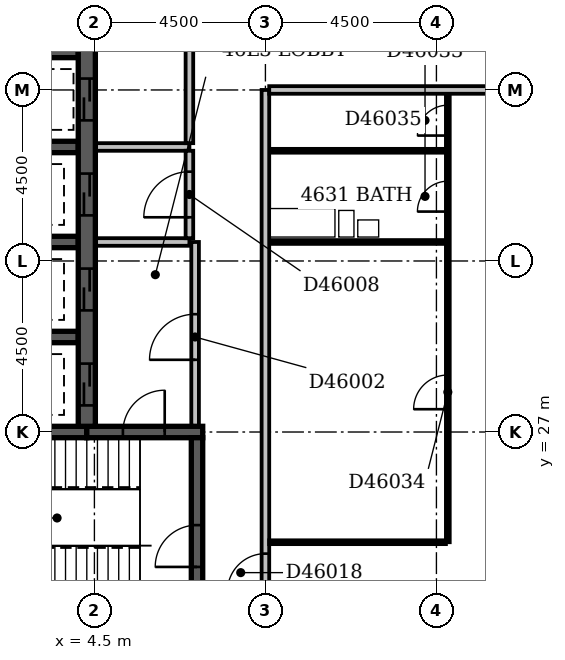
"""IFC4 building model, lengths in metres.
Left out: names, types, materials, properties, quantities, classifications, styles, units other than length and angle.
Written with IfcOpenShell. Run it as: python <this file> out.ifc"""

import sys

from ifc_helpers import new_model, si_unit, direction, frame, frame_2d, origin, place, context, subcontext, project, spatial, rectangle, extrude, element, fill, save


model = new_model("IFC4")
c1 = context("Model", 3, precision=1e-05, world=origin(), true_north=direction((0.0, 1.0)))
c2 = subcontext(c1, "Body", "Model", "MODEL_VIEW")
j1 = project(units=[si_unit("LENGTHUNIT", "METRE"), si_unit("PLANEANGLEUNIT", "RADIAN")], contexts=[c1])
p1 = place(None, origin())
s1 = spatial("IfcSite", under=j1, at=p1, CompositionType="ELEMENT")
p2 = place(p1, origin())
s2 = spatial("IfcBuilding", under=s1, at=p2, CompositionType="ELEMENT")
p3 = place(p2, frame((0.0, 0.0, 182.6)))
s3 = spatial("IfcBuildingStorey", under=s2, at=p3, CompositionType="ELEMENT", Elevation=182.6)
p4 = place(p3, frame((0.35, 27.0, -0.3), z_axis=(0.0, 0.0, 1.0), x_axis=(1.0, 0.0, 0.0)))
e1 = element("IfcWall", 1, at=p4, inside=s3, PredefinedType="SHEAR", context=c2, shape_type="SweptSolid", body=[
    extrude(rectangle(XDim=3.95, YDim=0.3, at=frame_2d((1.975, 0.0))), origin(), (0.0, 0.0, 1.0), 3.55),
])
for number, where, z_axis, x_axis in (
    (2, (0.725, 29.5, -0.3), (0.0, 0.0, 1.0), (1.0, 0.0, 0.0)),
    (3, (0.725, 32.0, -0.3), (0.0, 0.0, 1.0), (1.0, 0.0, 0.0)),
    (4, (0.725, 34.5, -0.3), (0.0, 0.0, 1.0), (1.0, 0.0, 0.0)),
    (5, (0.725, 37.0, -0.3), (0.0, 0.0, 1.0), (1.0, 0.0, 0.0)),
):
    element("IfcWall", number, at=place(p3, frame(where, z_axis=z_axis, x_axis=x_axis)), inside=s3, PredefinedType="SHEAR", context=c2, shape_type="SweptSolid", body=[
        extrude(rectangle(XDim=3.35, YDim=0.3, at=frame_2d((1.675, 0.0))), origin(), (0.0, 0.0, 1.0), 3.55),
    ])
p5 = place(p3, frame((4.3, 27.0, -0.3), z_axis=(0.0, 0.0, 1.0), x_axis=(1.0, 0.0, 0.0)))
e6 = element("IfcWall", 6, at=p5, inside=s3, PredefinedType="SHEAR", context=c2, shape_type="SweptSolid", body=[
    extrude(rectangle(XDim=3.05, YDim=0.3, at=frame_2d((1.525, 0.0))), origin(), (0.0, 0.0, 1.0), 3.55),
])
p6 = place(p5, frame((0.95, 0.0, 0.3)))
e7 = element("IfcOpeningElement", 7, at=p6, cuts=e6, PredefinedType="OPENING", context=c2, shape_type="SweptSolid", body=[
    extrude(rectangle(XDim=1.1, YDim=2.1, at=frame_2d((0.55, 1.05))), frame((0.0, 0.162, 0.0), z_axis=(0.0, -1.0, 0.0), x_axis=(1.0, 0.0, 0.0)), (0.0, 0.0, 1.0), 0.324),
])
p7 = place(p3, frame((4.3, 27.15, -0.3), z_axis=(0.0, 0.0, 1.0), x_axis=(0.0, 1.0, 0.0)))
e8 = element("IfcWall", 8, at=p7, inside=s3, PredefinedType="SHEAR", context=c2, shape_type="SweptSolid", body=[
    extrude(rectangle(XDim=22.125, YDim=0.45, at=frame_2d((11.062, 0.0))), origin(), (0.0, 0.0, 1.0), 3.55),
])
p8 = place(p7, frame((3.05, 0.0, 0.3)))
e9 = element("IfcOpeningElement", 9, at=p8, cuts=e8, PredefinedType="OPENING", context=c2, shape_type="SweptSolid", body=[
    extrude(rectangle(XDim=1.1, YDim=2.1, at=frame_2d((0.55, 1.05))), frame((0.0, 0.237, 0.0), z_axis=(0.0, -1.0, 0.0), x_axis=(1.0, 0.0, 0.0)), (0.0, 0.0, 1.0), 0.474),
])
p9 = place(p7, frame((0.55, 0.0, 0.3)))
e10 = element("IfcOpeningElement", 10, at=p9, cuts=e8, PredefinedType="OPENING", context=c2, shape_type="SweptSolid", body=[
    extrude(rectangle(XDim=1.1, YDim=2.1, at=frame_2d((0.55, 1.05))), frame((0.0, 0.237, 0.0), z_axis=(0.0, -1.0, 0.0), x_axis=(1.0, 0.0, 0.0)), (0.0, 0.0, 1.0), 0.474),
])
p10 = place(p7, frame((20.55, 0.0, 0.3)))
e11 = element("IfcOpeningElement", 11, at=p10, cuts=e8, PredefinedType="OPENING", context=c2, shape_type="SweptSolid", body=[
    extrude(rectangle(XDim=1.1, YDim=2.1, at=frame_2d((0.55, 1.05))), frame((0.0, 0.237, 0.0), z_axis=(0.0, -1.0, 0.0), x_axis=(1.0, 0.0, 0.0)), (0.0, 0.0, 1.0), 0.474),
])
p11 = place(p7, frame((18.05, 0.0, 0.3)))
e12 = element("IfcOpeningElement", 12, at=p11, cuts=e8, PredefinedType="OPENING", context=c2, shape_type="SweptSolid", body=[
    extrude(rectangle(XDim=1.1, YDim=2.1, at=frame_2d((0.55, 1.05))), frame((0.0, 0.237, 0.0), z_axis=(0.0, -1.0, 0.0), x_axis=(1.0, 0.0, 0.0)), (0.0, 0.0, 1.0), 0.474),
])
p12 = place(p7, frame((15.55, 0.0, 0.3)))
e13 = element("IfcOpeningElement", 13, at=p12, cuts=e8, PredefinedType="OPENING", context=c2, shape_type="SweptSolid", body=[
    extrude(rectangle(XDim=1.1, YDim=2.1, at=frame_2d((0.55, 1.05))), frame((0.0, 0.237, 0.0), z_axis=(0.0, -1.0, 0.0), x_axis=(1.0, 0.0, 0.0)), (0.0, 0.0, 1.0), 0.474),
])
p13 = place(p7, frame((13.05, 0.0, 0.3)))
e14 = element("IfcOpeningElement", 14, at=p13, cuts=e8, PredefinedType="OPENING", context=c2, shape_type="SweptSolid", body=[
    extrude(rectangle(XDim=1.1, YDim=2.1, at=frame_2d((0.55, 1.05))), frame((0.0, 0.237, 0.0), z_axis=(0.0, -1.0, 0.0), x_axis=(1.0, 0.0, 0.0)), (0.0, 0.0, 1.0), 0.474),
])
p14 = place(p7, frame((10.55, 0.0, 0.3)))
e15 = element("IfcOpeningElement", 15, at=p14, cuts=e8, PredefinedType="OPENING", context=c2, shape_type="SweptSolid", body=[
    extrude(rectangle(XDim=1.1, YDim=2.1, at=frame_2d((0.55, 1.05))), frame((0.0, 0.237, 0.0), z_axis=(0.0, -1.0, 0.0), x_axis=(1.0, 0.0, 0.0)), (0.0, 0.0, 1.0), 0.474),
])
p15 = place(p7, frame((8.05, 0.0, 0.3)))
e16 = element("IfcOpeningElement", 16, at=p15, cuts=e8, PredefinedType="OPENING", context=c2, shape_type="SweptSolid", body=[
    extrude(rectangle(XDim=1.1, YDim=2.1, at=frame_2d((0.55, 1.05))), frame((0.0, 0.237, 0.0), z_axis=(0.0, -1.0, 0.0), x_axis=(1.0, 0.0, 0.0)), (0.0, 0.0, 1.0), 0.474),
])
p16 = place(p7, frame((5.55, 0.0, 0.3)))
e17 = element("IfcOpeningElement", 17, at=p16, cuts=e8, PredefinedType="OPENING", context=c2, shape_type="SweptSolid", body=[
    extrude(rectangle(XDim=1.1, YDim=2.1, at=frame_2d((0.55, 1.05))), frame((0.0, 0.237, 0.0), z_axis=(0.0, -1.0, 0.0), x_axis=(1.0, 0.0, 0.0)), (0.0, 0.0, 1.0), 0.474),
])
p17 = place(p3, frame((7.2, 22.65, -0.3), z_axis=(0.0, 0.0, 1.0), x_axis=(0.0, 1.0, 0.0)))
e18 = element("IfcWall", 18, at=p17, inside=s3, PredefinedType="SHEAR", context=c2, shape_type="SweptSolid", body=[
    extrude(rectangle(XDim=4.2, YDim=0.3, at=frame_2d((2.1, 0.0))), origin(), (0.0, 0.0, 1.0), 3.55),
])
p18 = place(p17, frame((0.8, 0.0, 0.3)))
e19 = element("IfcOpeningElement", 19, at=p18, cuts=e18, PredefinedType="OPENING", context=c2, shape_type="SweptSolid", body=[
    extrude(rectangle(XDim=1.1, YDim=2.1, at=frame_2d((0.55, 1.05))), frame((0.0, 0.162, 0.0), z_axis=(0.0, -1.0, 0.0), x_axis=(1.0, 0.0, 0.0)), (0.0, 0.0, 1.0), 0.324),
])
p19 = place(p3, frame((4.545, 34.5, 0.0), z_axis=(0.0, 0.0, 1.0), x_axis=(1.0, 0.0, 0.0)))
e20 = element("IfcWall", 20, at=p19, inside=s3, PredefinedType="PARTITIONING", context=c2, shape_type="SweptSolid", body=[
    extrude(rectangle(XDim=2.455, YDim=0.2, at=frame_2d((1.228, 0.0))), origin(), (0.0, 0.0, 1.0), 3.25),
])
p20 = place(p3, frame((7.0, 34.6, 0.0), z_axis=(0.0, 0.0, 1.0), x_axis=(0.0, 1.0, 0.0)))
e21 = element("IfcWall", 21, at=p20, inside=s3, PredefinedType="PARTITIONING", context=c2, shape_type="SweptSolid", body=[
    extrude(rectangle(XDim=14.9, YDim=0.2, at=frame_2d((7.45, 0.0))), origin(), (0.0, 0.0, 1.0), 3.25),
])
p21 = place(p20, frame((2.8, 0.0, 0.0)))
e22 = element("IfcOpeningElement", 22, at=p21, cuts=e21, PredefinedType="OPENING", context=c2, shape_type="SweptSolid", body=[
    extrude(rectangle(XDim=1.2, YDim=2.1, at=frame_2d((0.6, 1.05))), frame((0.0, 0.112, 0.0), z_axis=(0.0, -1.0, 0.0), x_axis=(1.0, 0.0, 0.0)), (0.0, 0.0, 1.0), 0.224),
])
p22 = place(p20, frame((9.8, 0.0, 0.0)))
e23 = element("IfcOpeningElement", 23, at=p22, cuts=e21, PredefinedType="OPENING", context=c2, shape_type="SweptSolid", body=[
    extrude(rectangle(XDim=1.2, YDim=2.1, at=frame_2d((0.6, 1.05))), frame((0.0, 0.112, 0.0), z_axis=(0.0, -1.0, 0.0), x_axis=(1.0, 0.0, 0.0)), (0.0, 0.0, 1.0), 0.224),
])
p23 = place(p3, frame((4.545, 32.0, 0.0), z_axis=(0.0, 0.0, 1.0), x_axis=(1.0, 0.0, 0.0)))
e24 = element("IfcWall", 24, at=p23, inside=s3, PredefinedType="PARTITIONING", context=c2, shape_type="SweptSolid", body=[
    extrude(rectangle(XDim=2.455, YDim=0.2, at=frame_2d((1.228, 0.0))), origin(), (0.0, 0.0, 1.0), 3.25),
])
p24 = place(p3, frame((7.0, 32.1, 0.0), z_axis=(0.0, 0.0, 1.0), x_axis=(0.0, 1.0, 0.0)))
e25 = element("IfcWall", 25, at=p24, inside=s3, PredefinedType="PARTITIONING", context=c2, shape_type="SweptSolid", body=[
    extrude(rectangle(XDim=2.3, YDim=0.2, at=frame_2d((1.15, 0.0))), origin(), (0.0, 0.0, 1.0), 3.25),
])
p25 = place(p24, frame((0.55, 0.0, 0.0)))
e26 = element("IfcOpeningElement", 26, at=p25, cuts=e25, PredefinedType="OPENING", context=c2, shape_type="SweptSolid", body=[
    extrude(rectangle(XDim=1.2, YDim=2.1, at=frame_2d((0.6, 1.05))), frame((0.0, 0.112, 0.0), z_axis=(0.0, -1.0, 0.0), x_axis=(1.0, 0.0, 0.0)), (0.0, 0.0, 1.0), 0.224),
])
p26 = place(p3, frame((7.15, 27.17, 0.0), z_axis=(0.0, 0.0, 1.0), x_axis=(0.0, 1.0, 0.0)))
e27 = element("IfcWall", 27, at=p26, inside=s3, PredefinedType="PARTITIONING", context=c2, shape_type="SweptSolid", body=[
    extrude(rectangle(XDim=4.83, YDim=0.2, at=frame_2d((2.415, 0.0))), origin(), (0.0, 0.0, 1.0), 3.25),
])
p27 = place(p26, frame((1.73, 0.0, 0.0)))
e28 = element("IfcOpeningElement", 28, at=p27, cuts=e27, PredefinedType="OPENING", context=c2, shape_type="SweptSolid", body=[
    extrude(rectangle(XDim=1.2, YDim=2.1, at=frame_2d((0.6, 1.05))), frame((0.0, 0.112, 0.0), z_axis=(0.0, -1.0, 0.0), x_axis=(1.0, 0.0, 0.0)), (0.0, 0.0, 1.0), 0.224),
])
p28 = place(p3, frame((9.0, 5.0, 0.0), z_axis=(0.0, 0.0, 1.0), x_axis=(0.0, 1.0, 0.0)))
e29 = element("IfcWall", 29, at=p28, inside=s3, PredefinedType="PARTITIONING", context=c2, shape_type="SweptSolid", body=[
    extrude(rectangle(XDim=31.0, YDim=0.2, at=frame_2d((15.5, 0.0))), origin(), (0.0, 0.0, 1.0), 3.25),
])
p29 = place(p28, frame((17.8, 0.0, 0.0)))
e30 = element("IfcOpeningElement", 30, at=p29, cuts=e29, PredefinedType="OPENING", context=c2, shape_type="SweptSolid", body=[
    extrude(rectangle(XDim=1.0, YDim=2.1, at=frame_2d((0.5, 1.05))), frame((0.0, 0.112, 0.0), z_axis=(0.0, -1.0, 0.0), x_axis=(1.0, 0.0, 0.0)), (0.0, 0.0, 1.0), 0.224),
])
p30 = place(p28, frame((14.95, 0.0, 0.0)))
e31 = element("IfcOpeningElement", 31, at=p30, cuts=e29, PredefinedType="OPENING", context=c2, shape_type="SweptSolid", body=[
    extrude(rectangle(XDim=1.0, YDim=2.1, at=frame_2d((0.5, 1.05))), frame((0.0, 0.112, 0.0), z_axis=(0.0, -1.0, 0.0), x_axis=(1.0, 0.0, 0.0)), (0.0, 0.0, 1.0), 0.224),
])
p31 = place(p28, frame((9.3, 0.0, 0.0)))
e32 = element("IfcOpeningElement", 32, at=p31, cuts=e29, PredefinedType="OPENING", context=c2, shape_type="SweptSolid", body=[
    extrude(rectangle(XDim=1.0, YDim=2.1, at=frame_2d((0.5, 1.05))), frame((0.0, 0.112, 0.0), z_axis=(0.0, -1.0, 0.0), x_axis=(1.0, 0.0, 0.0)), (0.0, 0.0, 1.0), 0.224),
])
p32 = place(p28, frame((1.5, 0.0, 0.0)))
e33 = element("IfcOpeningElement", 33, at=p32, cuts=e29, PredefinedType="OPENING", context=c2, shape_type="SweptSolid", body=[
    extrude(rectangle(XDim=0.9, YDim=2.1, at=frame_2d((0.45, 1.05))), frame((0.0, 0.112, 0.0), z_axis=(0.0, -1.0, 0.0), x_axis=(1.0, 0.0, 0.0)), (0.0, 0.0, 1.0), 0.224),
])
p33 = place(p3, frame((9.1, 24.1, 0.0), z_axis=(0.0, 0.0, 1.0), x_axis=(1.0, 0.0, 0.0)))
e34 = element("IfcWall", 34, at=p33, inside=s3, PredefinedType="PARTITIONING", context=c2, shape_type="SweptSolid", body=[
    extrude(rectangle(XDim=4.65, YDim=0.1, at=frame_2d((2.325, 0.0))), origin(), (0.0, 0.0, 1.0), 3.25),
])
p34 = place(p3, frame((13.8, 24.1, 0.0), z_axis=(0.0, 0.0, 1.0), x_axis=(0.0, 1.0, 0.0)))
e35 = element("IfcWall", 35, at=p34, inside=s3, PredefinedType="PARTITIONING", context=c2, shape_type="SweptSolid", body=[
    extrude(rectangle(XDim=11.8, YDim=0.1, at=frame_2d((5.9, 0.0))), origin(), (0.0, 0.0, 1.0), 3.25),
])
p35 = place(p34, frame((8.7, 0.0, 0.0)))
e36 = element("IfcOpeningElement", 36, at=p35, cuts=e35, PredefinedType="OPENING", context=c2, shape_type="SweptSolid", body=[
    extrude(rectangle(XDim=0.8, YDim=2.1, at=frame_2d((0.4, 1.05))), frame((0.0, 0.062, 0.0), z_axis=(0.0, -1.0, 0.0), x_axis=(1.0, 0.0, 0.0)), (0.0, 0.0, 1.0), 0.124),
])
p36 = place(p34, frame((3.5, 0.0, 0.0)))
e37 = element("IfcOpeningElement", 37, at=p36, cuts=e35, PredefinedType="OPENING", context=c2, shape_type="SweptSolid", body=[
    extrude(rectangle(XDim=0.9, YDim=2.1, at=frame_2d((0.45, 1.05))), frame((0.0, 0.062, 0.0), z_axis=(0.0, -1.0, 0.0), x_axis=(1.0, 0.0, 0.0)), (0.0, 0.0, 1.0), 0.124),
])
p37 = place(p34, frame((10.7, 0.0, 0.0)))
e38 = element("IfcOpeningElement", 38, at=p37, cuts=e35, PredefinedType="OPENING", context=c2, shape_type="SweptSolid", body=[
    extrude(rectangle(XDim=0.8, YDim=2.1, at=frame_2d((0.4, 1.05))), frame((0.0, 0.062, 0.0), z_axis=(0.0, -1.0, 0.0), x_axis=(1.0, 0.0, 0.0)), (0.0, 0.0, 1.0), 0.124),
])
for number, where, z_axis, x_axis in (
    (39, (9.1, 32.0, 0.0), (0.0, 0.0, 1.0), (1.0, 0.0, 0.0)),
    (40, (9.1, 34.4, 0.0), (0.0, 0.0, 1.0), (1.0, 0.0, 0.0)),
):
    element("IfcWall", number, at=place(p3, frame(where, z_axis=z_axis, x_axis=x_axis)), inside=s3, PredefinedType="PLUMBINGWALL", context=c2, shape_type="SweptSolid", body=[
        extrude(rectangle(XDim=4.65, YDim=0.1, at=frame_2d((2.325, 0.0))), origin(), (0.0, 0.0, 1.0), 3.25),
    ])
p38 = place(p3, frame((9.1, 36.0, 0.0), z_axis=(0.0, 0.0, 1.0), x_axis=(1.0, 0.0, 0.0)))
e41 = element("IfcWall", 41, at=p38, inside=s3, PredefinedType="PARTITIONING", context=c2, shape_type="SweptSolid", body=[
    extrude(rectangle(XDim=12.95, YDim=0.2, at=frame_2d((6.475, 0.0))), origin(), (0.0, 0.0, 1.0), 3.25),
])
p39 = place(p27, origin())
e42 = element("IfcDoor", 42, at=p39, inside=s3, OperationType="SINGLE_SWING_LEFT", PredefinedType="DOOR", context=c2, shape_type="SweptSolid", body=[
    extrude(rectangle(XDim=1.2, YDim=2.1, at=frame_2d((0.6, 1.05))), frame((0.0, 0.025, 0.0), z_axis=(0.0, -1.0, 0.0), x_axis=(1.0, 0.0, 0.0)), (0.0, 0.0, 1.0), 0.05),
])
fill(e28, e42)
p40 = place(p8, origin())
e43 = element("IfcDoor", 43, at=p40, inside=s3, OperationType="SLIDING_TO_LEFT", PredefinedType="DOOR", context=c2, shape_type="SweptSolid", body=[
    extrude(rectangle(XDim=1.1, YDim=2.1, at=frame_2d((0.55, 1.05))), frame((0.0, 0.025, 0.0), z_axis=(0.0, -1.0, 0.0), x_axis=(1.0, 0.0, 0.0)), (0.0, 0.0, 1.0), 0.05),
])
fill(e9, e43)
p41 = place(p9, origin())
e44 = element("IfcDoor", 44, at=p41, inside=s3, OperationType="SLIDING_TO_LEFT", PredefinedType="DOOR", context=c2, shape_type="SweptSolid", body=[
    extrude(rectangle(XDim=1.1, YDim=2.1, at=frame_2d((0.55, 1.05))), frame((0.0, 0.025, 0.0), z_axis=(0.0, -1.0, 0.0), x_axis=(1.0, 0.0, 0.0)), (0.0, 0.0, 1.0), 0.05),
])
fill(e10, e44)
p42 = place(p15, origin())
e45 = element("IfcDoor", 45, at=p42, inside=s3, OperationType="SLIDING_TO_LEFT", PredefinedType="DOOR", context=c2, shape_type="SweptSolid", body=[
    extrude(rectangle(XDim=1.1, YDim=2.1, at=frame_2d((0.55, 1.05))), frame((0.0, 0.025, 0.0), z_axis=(0.0, -1.0, 0.0), x_axis=(1.0, 0.0, 0.0)), (0.0, 0.0, 1.0), 0.05),
])
fill(e16, e45)
p43 = place(p25, origin())
e46 = element("IfcDoor", 46, at=p43, inside=s3, OperationType="SINGLE_SWING_LEFT", PredefinedType="DOOR", context=c2, shape_type="SweptSolid", body=[
    extrude(rectangle(XDim=1.2, YDim=2.1, at=frame_2d((0.6, 1.05))), frame((0.0, 0.025, 0.0), z_axis=(0.0, -1.0, 0.0), x_axis=(1.0, 0.0, 0.0)), (0.0, 0.0, 1.0), 0.05),
])
fill(e26, e46)
p44 = place(p16, origin())
e47 = element("IfcDoor", 47, at=p44, inside=s3, OperationType="SLIDING_TO_LEFT", PredefinedType="DOOR", context=c2, shape_type="SweptSolid", body=[
    extrude(rectangle(XDim=1.1, YDim=2.1, at=frame_2d((0.55, 1.05))), frame((0.0, 0.025, 0.0), z_axis=(0.0, -1.0, 0.0), x_axis=(1.0, 0.0, 0.0)), (0.0, 0.0, 1.0), 0.05),
])
fill(e17, e47)
p45 = place(p6, frame((1.1, 0.0, 0.0), z_axis=(0.0, 0.0, 1.0), x_axis=(-1.0, 0.0, 0.0)))
e48 = element("IfcDoor", 48, at=p45, inside=s3, OperationType="SINGLE_SWING_LEFT", PredefinedType="DOOR", context=c2, shape_type="SweptSolid", body=[
    extrude(rectangle(XDim=1.1, YDim=2.1, at=frame_2d((0.55, 1.05))), frame((0.0, 0.025, 0.0), z_axis=(0.0, -1.0, 0.0), x_axis=(1.0, 0.0, 0.0)), (0.0, 0.0, 1.0), 0.05),
])
fill(e7, e48)
p46 = place(p18, origin())
e49 = element("IfcDoor", 49, at=p46, inside=s3, OperationType="SINGLE_SWING_LEFT", PredefinedType="DOOR", context=c2, shape_type="SweptSolid", body=[
    extrude(rectangle(XDim=1.1, YDim=2.1, at=frame_2d((0.55, 1.05))), frame((0.0, 0.025, 0.0), z_axis=(0.0, -1.0, 0.0), x_axis=(1.0, 0.0, 0.0)), (0.0, 0.0, 1.0), 0.05),
])
fill(e19, e49)
p47 = place(p29, origin())
e50 = element("IfcDoor", 50, at=p47, inside=s3, OperationType="SINGLE_SWING_LEFT", PredefinedType="DOOR", context=c2, shape_type="SweptSolid", body=[
    extrude(rectangle(XDim=1.0, YDim=2.1, at=frame_2d((0.5, 1.05))), frame((0.0, 0.025, 0.0), z_axis=(0.0, -1.0, 0.0), x_axis=(1.0, 0.0, 0.0)), (0.0, 0.0, 1.0), 0.05),
])
fill(e30, e50)
p48 = place(p35, origin())
e51 = element("IfcDoor", 51, at=p48, inside=s3, OperationType="SINGLE_SWING_LEFT", PredefinedType="DOOR", context=c2, shape_type="SweptSolid", body=[
    extrude(rectangle(XDim=0.8, YDim=2.1, at=frame_2d((0.4, 1.05))), frame((0.0, 0.025, 0.0), z_axis=(0.0, -1.0, 0.0), x_axis=(1.0, 0.0, 0.0)), (0.0, 0.0, 1.0), 0.05),
])
fill(e36, e51)
p49 = place(p36, origin())
e52 = element("IfcDoor", 52, at=p49, inside=s3, OperationType="SINGLE_SWING_LEFT", PredefinedType="DOOR", context=c2, shape_type="SweptSolid", body=[
    extrude(rectangle(XDim=0.9, YDim=2.1, at=frame_2d((0.45, 1.05))), frame((0.0, 0.025, 0.0), z_axis=(0.0, -1.0, 0.0), x_axis=(1.0, 0.0, 0.0)), (0.0, 0.0, 1.0), 0.05),
])
fill(e37, e52)
p50 = place(p37, origin())
e53 = element("IfcDoor", 53, at=p50, inside=s3, OperationType="SINGLE_SWING_LEFT", PredefinedType="DOOR", context=c2, shape_type="SweptSolid", body=[
    extrude(rectangle(XDim=0.8, YDim=2.1, at=frame_2d((0.4, 1.05))), frame((0.0, 0.025, 0.0), z_axis=(0.0, -1.0, 0.0), x_axis=(1.0, 0.0, 0.0)), (0.0, 0.0, 1.0), 0.05),
])
fill(e38, e53)
save(model, sys.argv[1])
